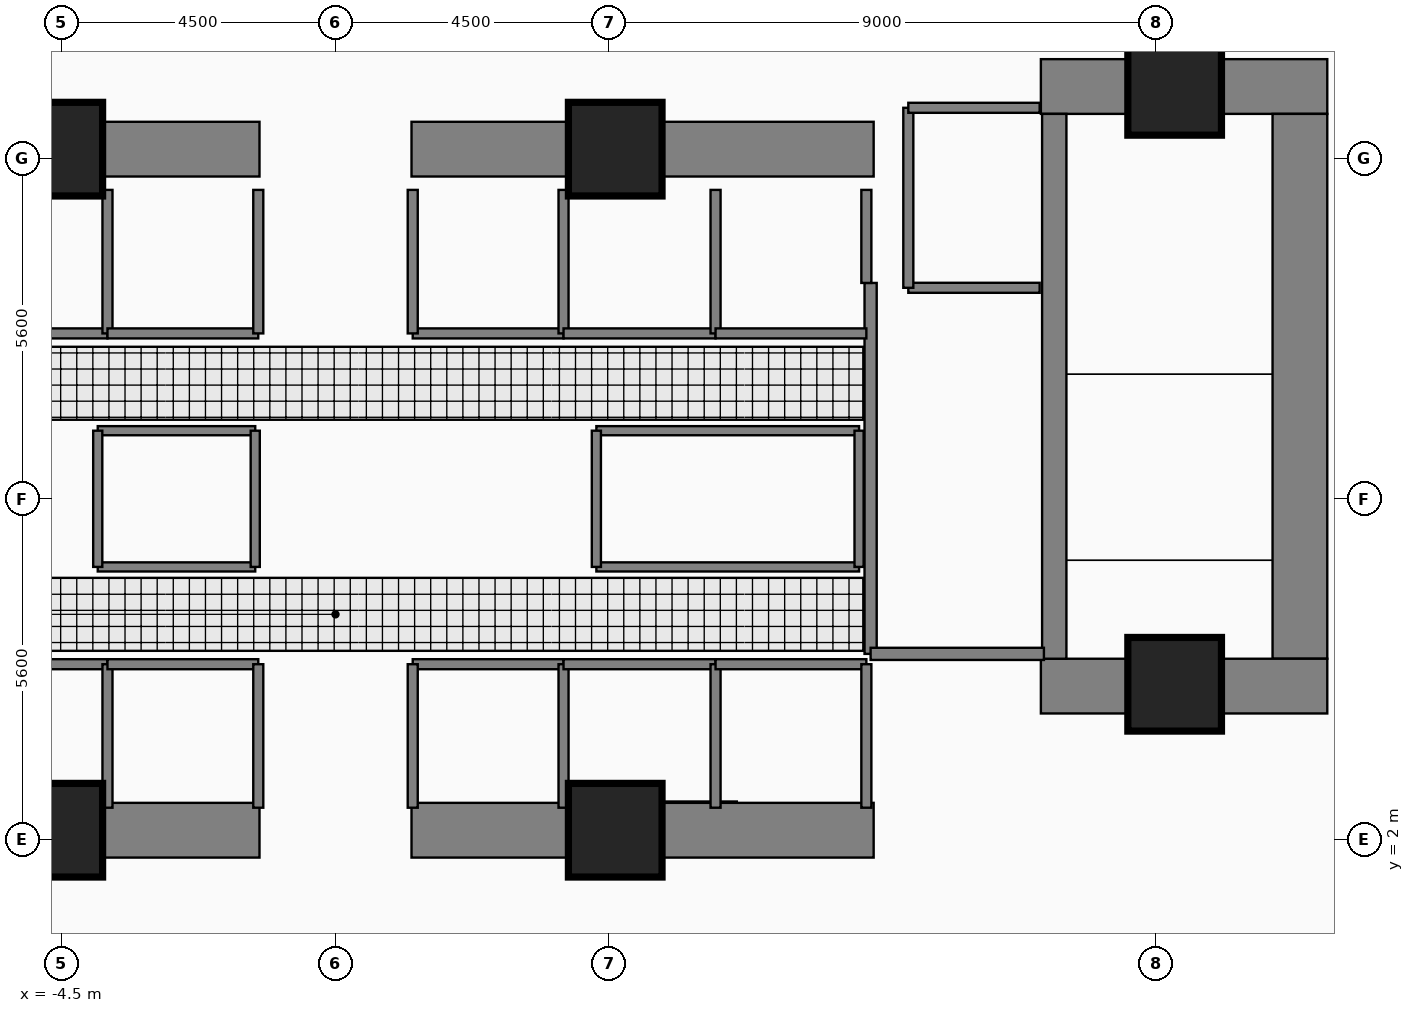
"""IFC4 building model, lengths in metres.
Left out: names, types, materials, properties, quantities, classifications, styles, units other than length and angle.
Written with IfcOpenShell. Run it as: python <this file> out.ifc"""

import sys

from ifc_helpers import new_model, si_unit, direction, frame, frame_2d, origin, origin_2d, place, context, subcontext, project, spatial, rectangle, extrude, element, fill, save


model = new_model("IFC4")
c1 = context("Model", 3, precision=1e-05, world=origin(), true_north=direction((0.0, 1.0)))
c2 = subcontext(c1, "Body", "Model", "MODEL_VIEW")
j1 = project(units=[si_unit("LENGTHUNIT", "METRE"), si_unit("PLANEANGLEUNIT", "RADIAN")], contexts=[c1])
p1 = place(None, origin())
s1 = spatial("IfcSite", under=j1, at=p1, CompositionType="ELEMENT")
p2 = place(p1, origin())
s2 = spatial("IfcBuilding", under=s1, at=p2, CompositionType="ELEMENT")
p3 = place(p2, frame((0.0, 0.0, 27.6)))
s3 = spatial("IfcBuildingStorey", under=s2, at=p3, CompositionType="ELEMENT", Elevation=27.6)
p4 = place(p3, frame((11.6, 14.38, 0.0), z_axis=(0.0, 0.0, 1.0), x_axis=(1.0, 0.0, 0.0)))
e1 = element("IfcWall", 1, at=p4, inside=s3, PredefinedType="SHEAR", context=c2, shape_type="SweptSolid", body=[
    extrude(rectangle(XDim=4.71, YDim=0.9, at=frame_2d((2.355, 0.0))), origin(), (0.0, 0.0, 1.0), 3.46),
])
p5 = place(p3, frame((15.86, 4.97, 0.0), z_axis=(0.0, 0.0, 1.0), x_axis=(0.0, 1.0, 0.0)))
e2 = element("IfcWall", 2, at=p5, inside=s3, PredefinedType="SHEAR", context=c2, shape_type="SweptSolid", body=[
    extrude(rectangle(XDim=8.96, YDim=0.9, at=frame_2d((4.48, 0.0))), origin(), (0.0, 0.0, 1.0), 3.46),
])
p6 = place(p3, frame((11.6, 4.52, 0.0), z_axis=(0.0, 0.0, 1.0), x_axis=(1.0, 0.0, 0.0)))
e3 = element("IfcWall", 3, at=p6, inside=s3, PredefinedType="SHEAR", context=c2, shape_type="SweptSolid", body=[
    extrude(rectangle(XDim=4.71, YDim=0.9, at=frame_2d((2.355, 0.0))), origin(), (0.0, 0.0, 1.0), 3.46),
])
for number, where, z_axis, x_axis in (
    (4, (-8.85, 2.15, 0.0), (0.0, 0.0, 1.0), (1.0, 0.0, 0.0)),
    (5, (1.25, 2.15, 0.0), (0.0, 0.0, 1.0), (1.0, 0.0, 0.0)),
    (6, (-8.85, 13.35, 0.0), (0.0, 0.0, 1.0), (1.0, 0.0, 0.0)),
    (7, (1.25, 13.35, 0.0), (0.0, 0.0, 1.0), (1.0, 0.0, 0.0)),
):
    element("IfcWall", number, at=place(p3, frame(where, z_axis=z_axis, x_axis=x_axis)), inside=s3, PredefinedType="SHEAR", context=c2, shape_type="SweptSolid", body=[
        extrude(rectangle(XDim=7.6, YDim=0.9, at=frame_2d((3.8, 0.0))), origin(), (0.0, 0.0, 1.0), 3.43),
    ])
p7 = place(p3, frame((11.82, 13.93, 0.0), z_axis=(0.0, 0.0, 1.0), x_axis=(0.0, -1.0, 0.0)))
e8 = element("IfcWall", 8, at=p7, inside=s3, PredefinedType="SHEAR", context=c2, shape_type="SweptSolid", body=[
    extrude(rectangle(XDim=8.96, YDim=0.4, at=frame_2d((4.48, 0.0))), origin(), (0.0, 0.0, 1.0), 3.46),
])
p8 = place(p7, frame((7.53, 0.0, 0.0)))
e9 = element("IfcOpeningElement", 9, at=p8, cuts=e8, PredefinedType="OPENING", context=c2, shape_type="SweptSolid", body=[
    extrude(rectangle(XDim=1.12, YDim=2.22, at=frame_2d((0.56, 1.11))), frame((0.0, 0.21, 0.0), z_axis=(0.0, -1.0, 0.0), x_axis=(1.0, 0.0, 0.0)), (0.0, 0.0, 1.0), 0.42),
])
for number, where, z_axis, x_axis in (
    (10, (-4.6, 13.35, 0.0), (0.0, 0.0, 1.0), (1.0, 0.0, 0.0)),
    (11, (4.6, 13.35, 0.0), (0.0, 0.0, 1.0), (1.0, 0.0, 0.0)),
    (12, (13.8, 14.35, 0.0), (0.0, 0.0, 1.0), (1.0, 0.0, 0.0)),
    (13, (-4.6, 2.15, 0.0), (0.0, 0.0, 1.0), (1.0, 0.0, 0.0)),
    (14, (4.6, 2.15, 0.0), (0.0, 0.0, 1.0), (1.0, 0.0, 0.0)),
    (15, (13.8, 4.55, 0.0), (0.0, 0.0, 1.0), (1.0, 0.0, 0.0)),
):
    element("IfcColumn", number, at=place(p3, frame(where, z_axis=z_axis, x_axis=x_axis)), inside=s3, PredefinedType="COLUMN", context=c2, shape_type="SweptSolid", body=[
        extrude(rectangle(XDim=1.5, YDim=1.5, at=origin_2d()), origin(), (0.0, 0.0, 1.0), 3.65),
    ])
p9 = place(p3, frame((8.8, 11.15, 0.0), z_axis=(0.0, 0.0, 1.0), x_axis=(0.0, -1.0, 0.0)))
e16 = element("IfcWall", 16, at=p9, inside=s3, PredefinedType="PARTITIONING", context=c2, shape_type="SweptSolid", body=[
    extrude(rectangle(XDim=6.1, YDim=0.2, at=frame_2d((3.05, 0.0))), origin(), (0.0, 0.0, 1.0), 3.43),
])
p10 = place(p9, frame((1.15, 0.0, 0.0)))
e17 = element("IfcOpeningElement", 17, at=p10, cuts=e16, PredefinedType="OPENING", context=c2, shape_type="SweptSolid", body=[
    extrude(rectangle(XDim=1.1, YDim=2.2, at=frame_2d((0.55, 1.1))), frame((0.0, 0.11, 0.0), z_axis=(0.0, -1.0, 0.0), x_axis=(1.0, 0.0, 0.0)), (0.0, 0.0, 1.0), 0.22),
])
p11 = place(p9, frame((4.75, 0.0, 0.0)))
e18 = element("IfcOpeningElement", 18, at=p11, cuts=e16, PredefinedType="OPENING", context=c2, shape_type="SweptSolid", body=[
    extrude(rectangle(XDim=1.1, YDim=2.2, at=frame_2d((0.55, 1.1))), frame((0.0, 0.11, 0.0), z_axis=(0.0, -1.0, 0.0), x_axis=(1.0, 0.0, 0.0)), (0.0, 0.0, 1.0), 0.22),
])
p12 = place(p3, frame((9.42, 11.07, 0.0), z_axis=(0.0, 0.0, 1.0), x_axis=(1.0, 0.0, 0.0)))
e19 = element("IfcWall", 19, at=p12, inside=s3, PredefinedType="PARTITIONING", context=c2, shape_type="SweptSolid", body=[
    extrude(rectangle(XDim=2.16, YDim=0.165, at=frame_2d((1.08, 0.0))), origin(), (0.0, 0.0, 1.0), 3.43),
])
p13 = place(p12, frame((0.53, 0.0, 0.0)))
e20 = element("IfcOpeningElement", 20, at=p13, cuts=e19, PredefinedType="OPENING", context=c2, shape_type="SweptSolid", body=[
    extrude(rectangle(XDim=1.15, YDim=2.25, at=frame_2d((0.575, 1.125))), frame((0.0, 0.093, 0.0), z_axis=(0.0, -1.0, 0.0), x_axis=(1.0, 0.0, 0.0)), (0.0, 0.0, 1.0), 0.185),
])
p14 = place(p3, frame((-6.25, 4.88, 0.0), z_axis=(0.0, 0.0, 1.0), x_axis=(1.0, 0.0, 0.0)))
e21 = element("IfcWall", 21, at=p14, inside=s3, PredefinedType="PARTITIONING", context=c2, shape_type="SweptSolid", body=[
    extrude(rectangle(XDim=2.5, YDim=0.165, at=frame_2d((1.25, 0.0))), origin(), (0.0, 0.0, 1.0), 3.43),
])
p15 = place(p14, frame((0.7, 0.0, 0.0)))
e22 = element("IfcOpeningElement", 22, at=p15, cuts=e21, PredefinedType="OPENING", context=c2, shape_type="SweptSolid", body=[
    extrude(rectangle(XDim=1.1, YDim=2.25, at=frame_2d((0.55, 1.125))), frame((0.0, 0.093, 0.0), z_axis=(0.0, -1.0, 0.0), x_axis=(1.0, 0.0, 0.0)), (0.0, 0.0, 1.0), 0.185),
])
p16 = place(p3, frame((-6.25, 10.32, 0.0), z_axis=(0.0, 0.0, 1.0), x_axis=(1.0, 0.0, 0.0)))
e23 = element("IfcWall", 23, at=p16, inside=s3, PredefinedType="PARTITIONING", context=c2, shape_type="SweptSolid", body=[
    extrude(rectangle(XDim=2.5, YDim=0.165, at=frame_2d((1.25, 0.0))), origin(), (0.0, 0.0, 1.0), 3.43),
])
p17 = place(p16, frame((0.7, 0.0, 0.0)))
e24 = element("IfcOpeningElement", 24, at=p17, cuts=e23, PredefinedType="OPENING", context=c2, shape_type="SweptSolid", body=[
    extrude(rectangle(XDim=1.1, YDim=2.25, at=frame_2d((0.55, 1.125))), frame((0.0, 0.093, 0.0), z_axis=(0.0, -1.0, 0.0), x_axis=(1.0, 0.0, 0.0)), (0.0, 0.0, 1.0), 0.185),
])
p18 = place(p3, frame((-3.91, 6.48, 0.0), z_axis=(0.0, 0.0, 1.0), x_axis=(1.0, 0.0, 0.0)))
e25 = element("IfcWall", 25, at=p18, inside=s3, PredefinedType="PARTITIONING", context=c2, shape_type="SweptSolid", body=[
    extrude(rectangle(XDim=2.59, YDim=0.15, at=frame_2d((1.295, 0.0))), origin(), (0.0, 0.0, 1.0), 3.43),
])
p19 = place(p18, frame((0.845, 0.0, 0.0)))
e26 = element("IfcOpeningElement", 26, at=p19, cuts=e25, PredefinedType="OPENING", context=c2, shape_type="SweptSolid", body=[
    extrude(rectangle(XDim=0.9, YDim=2.15, at=frame_2d((0.45, 1.075))), frame((0.0, 0.085, 0.0), z_axis=(0.0, -1.0, 0.0), x_axis=(1.0, 0.0, 0.0)), (0.0, 0.0, 1.0), 0.17),
])
p20 = place(p3, frame((4.29, 6.48, 0.0), z_axis=(0.0, 0.0, 1.0), x_axis=(1.0, 0.0, 0.0)))
e27 = element("IfcWall", 27, at=p20, inside=s3, PredefinedType="PARTITIONING", context=c2, shape_type="SweptSolid", body=[
    extrude(rectangle(XDim=4.32, YDim=0.15, at=frame_2d((2.16, 0.0))), origin(), (0.0, 0.0, 1.0), 3.43),
])
p21 = place(p20, frame((1.71, 0.0, 0.0)))
e28 = element("IfcOpeningElement", 28, at=p21, cuts=e27, PredefinedType="OPENING", context=c2, shape_type="SweptSolid", body=[
    extrude(rectangle(XDim=0.9, YDim=2.15, at=frame_2d((0.45, 1.075))), frame((0.0, 0.085, 0.0), z_axis=(0.0, -1.0, 0.0), x_axis=(1.0, 0.0, 0.0)), (0.0, 0.0, 1.0), 0.17),
])
p22 = place(p3, frame((8.8, 5.05, 0.0), z_axis=(0.0, 0.0, 1.0), x_axis=(1.0, 0.0, 0.0)))
e29 = element("IfcWall", 29, at=p22, inside=s3, PredefinedType="PARTITIONING", context=c2, shape_type="SweptSolid", body=[
    extrude(rectangle(XDim=2.85, YDim=0.2, at=frame_2d((1.425, 0.0))), origin(), (0.0, 0.0, 1.0), 3.43),
])
p23 = place(p3, frame((9.42, 11.07, 0.0), z_axis=(0.0, 0.0, 1.0), x_axis=(0.0, 1.0, 0.0)))
e30 = element("IfcWall", 30, at=p23, inside=s3, PredefinedType="PARTITIONING", context=c2, shape_type="SweptSolid", body=[
    extrude(rectangle(XDim=2.96, YDim=0.165, at=frame_2d((1.48, 0.0))), origin(), (0.0, 0.0, 1.0), 3.43),
])
p24 = place(p3, frame((9.42, 14.03, 0.0), z_axis=(0.0, 0.0, 1.0), x_axis=(1.0, 0.0, 0.0)))
e31 = element("IfcWall", 31, at=p24, inside=s3, PredefinedType="PARTITIONING", context=c2, shape_type="SweptSolid", body=[
    extrude(rectangle(XDim=2.16, YDim=0.165, at=frame_2d((1.08, 0.0))), origin(), (0.0, 0.0, 1.0), 3.43),
])
for number, where, z_axis, x_axis in (
    (32, (-3.75, 2.52, 0.0), (0.0, 0.0, 1.0), (0.0, 1.0, 0.0)),
    (33, (-3.75, 10.32, 0.0), (0.0, 0.0, 1.0), (0.0, 1.0, 0.0)),
):
    element("IfcWall", number, at=place(p3, frame(where, z_axis=z_axis, x_axis=x_axis)), inside=s3, PredefinedType="PARTITIONING", context=c2, shape_type="SweptSolid", body=[
        extrude(rectangle(XDim=2.36, YDim=0.165, at=frame_2d((1.18, 0.0))), origin(), (0.0, 0.0, 1.0), 3.43),
    ])
p25 = place(p3, frame((-3.75, 4.88, 0.0), z_axis=(0.0, 0.0, 1.0), x_axis=(1.0, 0.0, 0.0)))
e34 = element("IfcWall", 34, at=p25, inside=s3, PredefinedType="PARTITIONING", context=c2, shape_type="SweptSolid", body=[
    extrude(rectangle(XDim=2.48, YDim=0.165, at=frame_2d((1.24, 0.0))), origin(), (0.0, 0.0, 1.0), 3.43),
])
p26 = place(p3, frame((-1.27, 2.52, 0.0), z_axis=(0.0, 0.0, 1.0), x_axis=(0.0, 1.0, 0.0)))
e35 = element("IfcWall", 35, at=p26, inside=s3, PredefinedType="PARTITIONING", context=c2, shape_type="SweptSolid", body=[
    extrude(rectangle(XDim=2.36, YDim=0.165, at=frame_2d((1.18, 0.0))), origin(), (0.0, 0.0, 1.0), 3.43),
])
p27 = place(p3, frame((1.27, 4.88, 0.0), z_axis=(0.0, 0.0, 1.0), x_axis=(1.0, 0.0, 0.0)))
e36 = element("IfcWall", 36, at=p27, inside=s3, PredefinedType="PARTITIONING", context=c2, shape_type="SweptSolid", body=[
    extrude(rectangle(XDim=2.48, YDim=0.165, at=frame_2d((1.24, 0.0))), origin(), (0.0, 0.0, 1.0), 3.43),
])
for number, where, z_axis, x_axis in (
    (37, (1.27, 2.52, 0.0), (0.0, 0.0, 1.0), (0.0, 1.0, 0.0)),
    (38, (3.75, 2.52, 0.0), (0.0, 0.0, 1.0), (0.0, 1.0, 0.0)),
):
    element("IfcWall", number, at=place(p3, frame(where, z_axis=z_axis, x_axis=x_axis)), inside=s3, PredefinedType="PARTITIONING", context=c2, shape_type="SweptSolid", body=[
        extrude(rectangle(XDim=2.36, YDim=0.165, at=frame_2d((1.18, 0.0))), origin(), (0.0, 0.0, 1.0), 3.43),
    ])
p28 = place(p3, frame((-3.75, 10.32, 0.0), z_axis=(0.0, 0.0, 1.0), x_axis=(1.0, 0.0, 0.0)))
e39 = element("IfcWall", 39, at=p28, inside=s3, PredefinedType="PARTITIONING", context=c2, shape_type="SweptSolid", body=[
    extrude(rectangle(XDim=2.48, YDim=0.165, at=frame_2d((1.24, 0.0))), origin(), (0.0, 0.0, 1.0), 3.43),
])
p29 = place(p3, frame((-1.27, 10.32, 0.0), z_axis=(0.0, 0.0, 1.0), x_axis=(0.0, 1.0, 0.0)))
e40 = element("IfcWall", 40, at=p29, inside=s3, PredefinedType="PARTITIONING", context=c2, shape_type="SweptSolid", body=[
    extrude(rectangle(XDim=2.36, YDim=0.165, at=frame_2d((1.18, 0.0))), origin(), (0.0, 0.0, 1.0), 3.43),
])
p30 = place(p3, frame((1.27, 10.32, 0.0), z_axis=(0.0, 0.0, 1.0), x_axis=(1.0, 0.0, 0.0)))
e41 = element("IfcWall", 41, at=p30, inside=s3, PredefinedType="PARTITIONING", context=c2, shape_type="SweptSolid", body=[
    extrude(rectangle(XDim=2.48, YDim=0.165, at=frame_2d((1.24, 0.0))), origin(), (0.0, 0.0, 1.0), 3.43),
])
for number, where, z_axis, x_axis in (
    (42, (1.27, 10.32, 0.0), (0.0, 0.0, 1.0), (0.0, 1.0, 0.0)),
    (43, (3.75, 10.32, 0.0), (0.0, 0.0, 1.0), (0.0, 1.0, 0.0)),
):
    element("IfcWall", number, at=place(p3, frame(where, z_axis=z_axis, x_axis=x_axis)), inside=s3, PredefinedType="PARTITIONING", context=c2, shape_type="SweptSolid", body=[
        extrude(rectangle(XDim=2.36, YDim=0.165, at=frame_2d((1.18, 0.0))), origin(), (0.0, 0.0, 1.0), 3.43),
    ])
p31 = place(p3, frame((3.75, 4.88, 0.0), z_axis=(0.0, 0.0, 1.0), x_axis=(1.0, 0.0, 0.0)))
e44 = element("IfcWall", 44, at=p31, inside=s3, PredefinedType="PARTITIONING", context=c2, shape_type="SweptSolid", body=[
    extrude(rectangle(XDim=2.5, YDim=0.165, at=frame_2d((1.25, 0.0))), origin(), (0.0, 0.0, 1.0), 3.43),
])
p32 = place(p3, frame((6.25, 2.52, 0.0), z_axis=(0.0, 0.0, 1.0), x_axis=(0.0, 1.0, 0.0)))
e45 = element("IfcWall", 45, at=p32, inside=s3, PredefinedType="PARTITIONING", context=c2, shape_type="SweptSolid", body=[
    extrude(rectangle(XDim=2.36, YDim=0.165, at=frame_2d((1.18, 0.0))), origin(), (0.0, 0.0, 1.0), 3.43),
])
p33 = place(p3, frame((6.25, 4.88, 0.0), z_axis=(0.0, 0.0, 1.0), x_axis=(1.0, 0.0, 0.0)))
e46 = element("IfcWall", 46, at=p33, inside=s3, PredefinedType="PARTITIONING", context=c2, shape_type="SweptSolid", body=[
    extrude(rectangle(XDim=2.48, YDim=0.165, at=frame_2d((1.24, 0.0))), origin(), (0.0, 0.0, 1.0), 3.43),
])
p34 = place(p3, frame((8.73, 2.52, 0.0), z_axis=(0.0, 0.0, 1.0), x_axis=(0.0, 1.0, 0.0)))
e47 = element("IfcWall", 47, at=p34, inside=s3, PredefinedType="PARTITIONING", context=c2, shape_type="SweptSolid", body=[
    extrude(rectangle(XDim=2.36, YDim=0.165, at=frame_2d((1.18, 0.0))), origin(), (0.0, 0.0, 1.0), 3.43),
])
p35 = place(p3, frame((3.75, 10.32, 0.0), z_axis=(0.0, 0.0, 1.0), x_axis=(1.0, 0.0, 0.0)))
e48 = element("IfcWall", 48, at=p35, inside=s3, PredefinedType="PARTITIONING", context=c2, shape_type="SweptSolid", body=[
    extrude(rectangle(XDim=2.5, YDim=0.165, at=frame_2d((1.25, 0.0))), origin(), (0.0, 0.0, 1.0), 3.43),
])
p36 = place(p3, frame((6.25, 10.32, 0.0), z_axis=(0.0, 0.0, 1.0), x_axis=(0.0, 1.0, 0.0)))
e49 = element("IfcWall", 49, at=p36, inside=s3, PredefinedType="PARTITIONING", context=c2, shape_type="SweptSolid", body=[
    extrude(rectangle(XDim=2.36, YDim=0.165, at=frame_2d((1.18, 0.0))), origin(), (0.0, 0.0, 1.0), 3.43),
])
p37 = place(p3, frame((6.25, 10.32, 0.0), z_axis=(0.0, 0.0, 1.0), x_axis=(1.0, 0.0, 0.0)))
e50 = element("IfcWall", 50, at=p37, inside=s3, PredefinedType="PARTITIONING", context=c2, shape_type="SweptSolid", body=[
    extrude(rectangle(XDim=2.48, YDim=0.165, at=frame_2d((1.24, 0.0))), origin(), (0.0, 0.0, 1.0), 3.43),
])
p38 = place(p3, frame((8.73, 11.15, 0.0), z_axis=(0.0, 0.0, 1.0), x_axis=(0.0, 1.0, 0.0)))
e51 = element("IfcWall", 51, at=p38, inside=s3, PredefinedType="PARTITIONING", context=c2, shape_type="SweptSolid", body=[
    extrude(rectangle(XDim=1.53, YDim=0.165, at=frame_2d((0.765, 0.0))), origin(), (0.0, 0.0, 1.0), 3.43),
])
p39 = place(p3, frame((-3.91, 8.72, 0.0), z_axis=(0.0, 0.0, 1.0), x_axis=(1.0, 0.0, 0.0)))
e52 = element("IfcWall", 52, at=p39, inside=s3, PredefinedType="PARTITIONING", context=c2, shape_type="SweptSolid", body=[
    extrude(rectangle(XDim=2.59, YDim=0.15, at=frame_2d((1.295, 0.0))), origin(), (0.0, 0.0, 1.0), 3.43),
])
for number, where, z_axis, x_axis in (
    (53, (-3.91, 6.48, 0.0), (0.0, 0.0, 1.0), (0.0, 1.0, 0.0)),
    (54, (-1.32, 6.48, 0.0), (0.0, 0.0, 1.0), (0.0, 1.0, 0.0)),
):
    element("IfcWall", number, at=place(p3, frame(where, z_axis=z_axis, x_axis=x_axis)), inside=s3, PredefinedType="PARTITIONING", context=c2, shape_type="SweptSolid", body=[
        extrude(rectangle(XDim=2.24, YDim=0.15, at=frame_2d((1.12, 0.0))), origin(), (0.0, 0.0, 1.0), 3.43),
    ])
p40 = place(p3, frame((4.29, 8.72, 0.0), z_axis=(0.0, 0.0, 1.0), x_axis=(1.0, 0.0, 0.0)))
e55 = element("IfcWall", 55, at=p40, inside=s3, PredefinedType="PARTITIONING", context=c2, shape_type="SweptSolid", body=[
    extrude(rectangle(XDim=4.32, YDim=0.15, at=frame_2d((2.16, 0.0))), origin(), (0.0, 0.0, 1.0), 3.43),
])
for number, where, z_axis, x_axis in (
    (56, (4.29, 6.48, 0.0), (0.0, 0.0, 1.0), (0.0, 1.0, 0.0)),
    (57, (8.61, 6.48, 0.0), (0.0, 0.0, 1.0), (0.0, 1.0, 0.0)),
):
    element("IfcWall", number, at=place(p3, frame(where, z_axis=z_axis, x_axis=x_axis)), inside=s3, PredefinedType="PARTITIONING", context=c2, shape_type="SweptSolid", body=[
        extrude(rectangle(XDim=2.24, YDim=0.15, at=frame_2d((1.12, 0.0))), origin(), (0.0, 0.0, 1.0), 3.43),
    ])
p41 = place(p8, origin())
e58 = element("IfcDoor", 58, at=p41, inside=s3, OperationType="SINGLE_SWING_RIGHT", PredefinedType="DOOR", context=c2, shape_type="SweptSolid", body=[
    extrude(rectangle(XDim=1.12, YDim=2.22, at=frame_2d((0.56, 1.11))), frame((0.0, 0.025, 0.0), z_axis=(0.0, -1.0, 0.0), x_axis=(1.0, 0.0, 0.0)), (0.0, 0.0, 1.0), 0.05),
])
fill(e9, e58)
p42 = place(p10, origin())
e59 = element("IfcDoor", 59, at=p42, inside=s3, OperationType="SINGLE_SWING_LEFT", PredefinedType="DOOR", context=c2, shape_type="SweptSolid", body=[
    extrude(rectangle(XDim=1.1, YDim=2.2, at=frame_2d((0.55, 1.1))), frame((0.0, 0.025, 0.0), z_axis=(0.0, -1.0, 0.0), x_axis=(1.0, 0.0, 0.0)), (0.0, 0.0, 1.0), 0.05),
])
fill(e17, e59)
p43 = place(p11, origin())
e60 = element("IfcDoor", 60, at=p43, inside=s3, OperationType="SINGLE_SWING_RIGHT", PredefinedType="DOOR", context=c2, shape_type="SweptSolid", body=[
    extrude(rectangle(XDim=1.1, YDim=2.2, at=frame_2d((0.55, 1.1))), frame((0.0, 0.025, 0.0), z_axis=(0.0, -1.0, 0.0), x_axis=(1.0, 0.0, 0.0)), (0.0, 0.0, 1.0), 0.05),
])
fill(e18, e60)
p44 = place(p13, origin())
e61 = element("IfcDoor", 61, at=p44, inside=s3, OperationType="SLIDING_TO_LEFT", PredefinedType="DOOR", context=c2, shape_type="SweptSolid", body=[
    extrude(rectangle(XDim=1.15, YDim=2.25, at=frame_2d((0.575, 1.125))), frame((0.0, 0.025, 0.0), z_axis=(0.0, -1.0, 0.0), x_axis=(1.0, 0.0, 0.0)), (0.0, 0.0, 1.0), 0.05),
])
fill(e20, e61)
p45 = place(p15, origin())
e62 = element("IfcDoor", 62, at=p45, inside=s3, OperationType="SLIDING_TO_LEFT", PredefinedType="DOOR", context=c2, shape_type="SweptSolid", body=[
    extrude(rectangle(XDim=1.1, YDim=2.25, at=frame_2d((0.55, 1.125))), frame((0.0, 0.025, 0.0), z_axis=(0.0, -1.0, 0.0), x_axis=(1.0, 0.0, 0.0)), (0.0, 0.0, 1.0), 0.05),
])
fill(e22, e62)
p46 = place(p17, origin())
e63 = element("IfcDoor", 63, at=p46, inside=s3, OperationType="SLIDING_TO_LEFT", PredefinedType="DOOR", context=c2, shape_type="SweptSolid", body=[
    extrude(rectangle(XDim=1.1, YDim=2.25, at=frame_2d((0.55, 1.125))), frame((0.0, 0.025, 0.0), z_axis=(0.0, -1.0, 0.0), x_axis=(1.0, 0.0, 0.0)), (0.0, 0.0, 1.0), 0.05),
])
fill(e24, e63)
p47 = place(p19, origin())
e64 = element("IfcDoor", 64, at=p47, inside=s3, OperationType="SINGLE_SWING_RIGHT", PredefinedType="DOOR", context=c2, shape_type="SweptSolid", body=[
    extrude(rectangle(XDim=0.9, YDim=2.15, at=frame_2d((0.45, 1.075))), frame((0.0, 0.025, 0.0), z_axis=(0.0, -1.0, 0.0), x_axis=(1.0, 0.0, 0.0)), (0.0, 0.0, 1.0), 0.05),
])
fill(e26, e64)
p48 = place(p21, origin())
e65 = element("IfcDoor", 65, at=p48, inside=s3, OperationType="SINGLE_SWING_LEFT", PredefinedType="DOOR", context=c2, shape_type="SweptSolid", body=[
    extrude(rectangle(XDim=0.9, YDim=2.15, at=frame_2d((0.45, 1.075))), frame((0.0, 0.025, 0.0), z_axis=(0.0, -1.0, 0.0), x_axis=(1.0, 0.0, 0.0)), (0.0, 0.0, 1.0), 0.05),
])
fill(e28, e65)
save(model, sys.argv[1])
